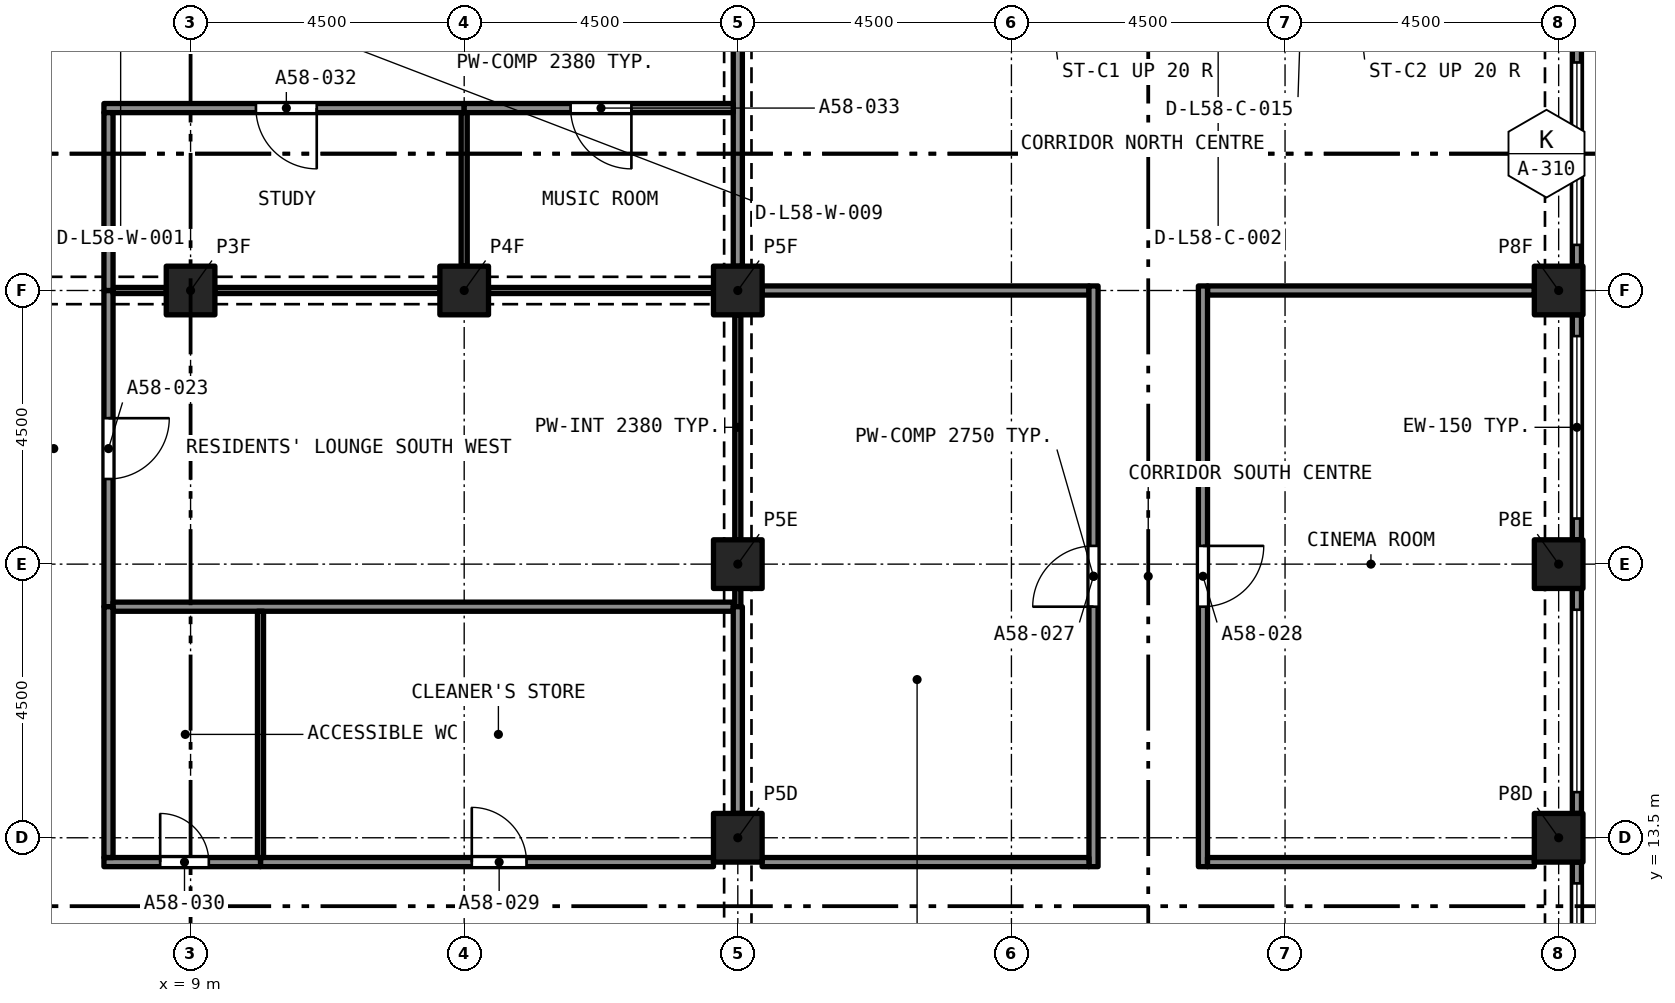
"""IFC4 building model, lengths in metres.
Left out: names, types, materials, properties, quantities, classifications, styles, units other than length and angle.
Written with IfcOpenShell. Run it as: python <this file> out.ifc"""

import sys

from ifc_helpers import new_model, si_unit, direction, frame, frame_2d, origin, origin_2d, place, context, subcontext, project, spatial, rectangle, extrude, element, fill, save


model = new_model("IFC4")
c1 = context("Model", 3, precision=1e-05, world=origin(), true_north=direction((0.0, 1.0)))
c2 = subcontext(c1, "Body", "Model", "MODEL_VIEW")
j1 = project(units=[si_unit("LENGTHUNIT", "METRE"), si_unit("PLANEANGLEUNIT", "RADIAN")], contexts=[c1])
p1 = place(None, origin())
s1 = spatial("IfcSite", under=j1, at=p1, CompositionType="ELEMENT")
p2 = place(p1, origin())
s2 = spatial("IfcBuilding", under=s1, at=p2, CompositionType="ELEMENT")
p3 = place(p2, frame((0.0, 0.0, 210.095)))
s3 = spatial("IfcBuildingStorey", under=s2, at=p3, CompositionType="ELEMENT", Elevation=210.095)
for number, where, z_axis, x_axis in (
    (1, (18.0, 13.5, 0.0), (0.0, 0.0, 1.0), (1.0, 0.0, 0.0)),
    (2, (31.5, 13.5, 0.0), (0.0, 0.0, 1.0), (1.0, 0.0, 0.0)),
    (3, (18.0, 18.0, 0.0), (0.0, 0.0, 1.0), (1.0, 0.0, 0.0)),
    (4, (31.5, 18.0, 0.0), (0.0, 0.0, 1.0), (1.0, 0.0, 0.0)),
    (5, (9.0, 22.5, 0.0), (0.0, 0.0, 1.0), (1.0, 0.0, 0.0)),
    (6, (13.5, 22.5, 0.0), (0.0, 0.0, 1.0), (1.0, 0.0, 0.0)),
    (7, (18.0, 22.5, 0.0), (0.0, 0.0, 1.0), (1.0, 0.0, 0.0)),
    (8, (31.5, 22.5, 0.0), (0.0, 0.0, 1.0), (1.0, 0.0, 0.0)),
):
    element("IfcColumn", number, at=place(p3, frame(where, z_axis=z_axis, x_axis=x_axis)), inside=s3, PredefinedType="COLUMN", context=c2, shape_type="SweptSolid", body=[
        extrude(rectangle(XDim=0.8, YDim=0.8, at=origin_2d()), origin(), (0.0, 0.0, 1.0), 3.2),
    ])
p4 = place(p3, frame((31.8, 13.1, 0.0), z_axis=(0.0, 0.0, 1.0), x_axis=(0.0, -1.0, 0.0)))
e9 = element("IfcWall", 9, at=p4, inside=s3, PredefinedType="SOLIDWALL", context=c2, shape_type="SweptSolid", body=[
    extrude(rectangle(XDim=3.7, YDim=0.15, at=frame_2d((1.85, 0.0))), origin(), (0.0, 0.0, 1.0), 3.2),
])
p5 = place(p4, frame((0.35, 0.0, 0.45)))
e10 = element("IfcOpeningElement", 10, at=p5, cuts=e9, PredefinedType="OPENING", context=c2, shape_type="SweptSolid", body=[
    extrude(rectangle(XDim=3.0, YDim=1.95, at=frame_2d((1.5, 0.975))), frame((0.0, 0.085, 0.0), z_axis=(0.0, -1.0, 0.0), x_axis=(1.0, 0.0, 0.0)), (0.0, 0.0, 1.0), 0.17),
])
p6 = place(p3, frame((31.8, 17.6, 0.0), z_axis=(0.0, 0.0, 1.0), x_axis=(0.0, -1.0, 0.0)))
e11 = element("IfcWall", 11, at=p6, inside=s3, PredefinedType="SOLIDWALL", context=c2, shape_type="SweptSolid", body=[
    extrude(rectangle(XDim=3.7, YDim=0.15, at=frame_2d((1.85, 0.0))), origin(), (0.0, 0.0, 1.0), 3.2),
])
p7 = place(p6, frame((0.35, 0.0, 0.45)))
e12 = element("IfcOpeningElement", 12, at=p7, cuts=e11, PredefinedType="OPENING", context=c2, shape_type="SweptSolid", body=[
    extrude(rectangle(XDim=3.0, YDim=1.95, at=frame_2d((1.5, 0.975))), frame((0.0, 0.085, 0.0), z_axis=(0.0, -1.0, 0.0), x_axis=(1.0, 0.0, 0.0)), (0.0, 0.0, 1.0), 0.17),
])
p8 = place(p3, frame((31.8, 22.1, 0.0), z_axis=(0.0, 0.0, 1.0), x_axis=(0.0, -1.0, 0.0)))
e13 = element("IfcWall", 13, at=p8, inside=s3, PredefinedType="SOLIDWALL", context=c2, shape_type="SweptSolid", body=[
    extrude(rectangle(XDim=3.7, YDim=0.15, at=frame_2d((1.85, 0.0))), origin(), (0.0, 0.0, 1.0), 3.2),
])
p9 = place(p8, frame((0.35, 0.0, 0.45)))
e14 = element("IfcOpeningElement", 14, at=p9, cuts=e13, PredefinedType="OPENING", context=c2, shape_type="SweptSolid", body=[
    extrude(rectangle(XDim=3.0, YDim=1.95, at=frame_2d((1.5, 0.975))), frame((0.0, 0.085, 0.0), z_axis=(0.0, -1.0, 0.0), x_axis=(1.0, 0.0, 0.0)), (0.0, 0.0, 1.0), 0.17),
])
p10 = place(p3, frame((31.8, 26.6, 0.0), z_axis=(0.0, 0.0, 1.0), x_axis=(0.0, -1.0, 0.0)))
e15 = element("IfcWall", 15, at=p10, inside=s3, PredefinedType="SOLIDWALL", context=c2, shape_type="SweptSolid", body=[
    extrude(rectangle(XDim=3.7, YDim=0.15, at=frame_2d((1.85, 0.0))), origin(), (0.0, 0.0, 1.0), 3.2),
])
p11 = place(p10, frame((0.35, 0.0, 0.45)))
e16 = element("IfcOpeningElement", 16, at=p11, cuts=e15, PredefinedType="OPENING", context=c2, shape_type="SweptSolid", body=[
    extrude(rectangle(XDim=3.0, YDim=1.95, at=frame_2d((1.5, 0.975))), frame((0.0, 0.085, 0.0), z_axis=(0.0, -1.0, 0.0), x_axis=(1.0, 0.0, 0.0)), (0.0, 0.0, 1.0), 0.17),
])
p12 = place(p3, frame((18.0, 18.4, 0.0), z_axis=(0.0, 0.0, 1.0), x_axis=(0.0, 1.0, 0.0)))
e17 = element("IfcWall", 17, at=p12, inside=s3, PredefinedType="PARTITIONING", context=c2, shape_type="SweptSolid", body=[
    extrude(rectangle(XDim=3.7, YDim=0.1, at=frame_2d((1.85, 0.0))), origin(), (0.0, 0.0, 1.0), 2.38),
])
p13 = place(p3, frame((18.0, 17.3, 0.0), z_axis=(0.0, 0.0, 1.0), x_axis=(0.0, 1.0, 0.0)))
e18 = element("IfcWall", 18, at=p13, inside=s3, PredefinedType="PARTITIONING", context=c2, shape_type="SweptSolid", body=[
    extrude(rectangle(XDim=0.3, YDim=0.1, at=frame_2d((0.15, 0.0))), origin(), (0.0, 0.0, 1.0), 2.75),
])
p14 = place(p3, frame((7.65, 22.5, 0.0), z_axis=(0.0, 0.0, 1.0), x_axis=(0.0, -1.0, 0.0)))
e19 = element("IfcWall", 19, at=p14, inside=s3, PredefinedType="PARTITIONING", context=c2, shape_type="SweptSolid", body=[
    extrude(rectangle(XDim=5.2, YDim=0.15, at=frame_2d((2.6, 0.0))), origin(), (0.0, 0.0, 1.0), 2.9),
])
p15 = place(p14, frame((2.1, 0.0, 0.0)))
e20 = element("IfcOpeningElement", 20, at=p15, cuts=e19, PredefinedType="OPENING", context=c2, shape_type="SweptSolid", body=[
    extrude(rectangle(XDim=1.0, YDim=2.1, at=frame_2d((0.5, 1.05))), frame((0.0, 0.085, 0.0), z_axis=(0.0, -1.0, 0.0), x_axis=(1.0, 0.0, 0.0)), (0.0, 0.0, 1.0), 0.17),
])
p16 = place(p3, frame((7.725, 22.5, 0.0), z_axis=(0.0, 0.0, 1.0), x_axis=(1.0, 0.0, 0.0)))
e21 = element("IfcWall", 21, at=p16, inside=s3, PredefinedType="PARTITIONING", context=c2, shape_type="SweptSolid", body=[
    extrude(rectangle(XDim=0.875, YDim=0.1, at=frame_2d((0.438, 0.0))), origin(), (0.0, 0.0, 1.0), 2.38),
])
for number, where, z_axis, x_axis in (
    (22, (9.4, 22.5, 0.0), (0.0, 0.0, 1.0), (1.0, 0.0, 0.0)),
    (23, (13.9, 22.5, 0.0), (0.0, 0.0, 1.0), (1.0, 0.0, 0.0)),
):
    element("IfcWall", number, at=place(p3, frame(where, z_axis=z_axis, x_axis=x_axis)), inside=s3, PredefinedType="PARTITIONING", context=c2, shape_type="SweptSolid", body=[
        extrude(rectangle(XDim=3.7, YDim=0.1, at=frame_2d((1.85, 0.0))), origin(), (0.0, 0.0, 1.0), 2.38),
    ])
p17 = place(p3, frame((7.725, 17.3, 0.0), z_axis=(0.0, 0.0, 1.0), x_axis=(1.0, 0.0, 0.0)))
e24 = element("IfcWall", 24, at=p17, inside=s3, PredefinedType="PARTITIONING", context=c2, shape_type="SweptSolid", body=[
    extrude(rectangle(XDim=10.2, YDim=0.15, at=frame_2d((5.1, 0.0))), origin(), (0.0, 0.0, 1.0), 2.9),
])
for number, where, z_axis, x_axis in (
    (25, (18.4, 22.5, 0.0), (0.0, 0.0, 1.0), (1.0, 0.0, 0.0)),
    (26, (25.725, 22.5, 0.0), (0.0, 0.0, 1.0), (1.0, 0.0, 0.0)),
):
    element("IfcWall", number, at=place(p3, frame(where, z_axis=z_axis, x_axis=x_axis)), inside=s3, PredefinedType="PARTITIONING", context=c2, shape_type="SweptSolid", body=[
        extrude(rectangle(XDim=5.375, YDim=0.15, at=frame_2d((2.688, 0.0))), origin(), (0.0, 0.0, 1.0), 2.75),
    ])
p18 = place(p3, frame((18.0, 22.9, 0.0), z_axis=(0.0, 0.0, 1.0), x_axis=(0.0, 1.0, 0.0)))
e27 = element("IfcWall", 27, at=p18, inside=s3, PredefinedType="PARTITIONING", context=c2, shape_type="SweptSolid", body=[
    extrude(rectangle(XDim=3.7, YDim=0.15, at=frame_2d((1.85, 0.0))), origin(), (0.0, 0.0, 1.0), 2.38),
])
p19 = place(p3, frame((23.85, 13.025, 0.0), z_axis=(0.0, 0.0, 1.0), x_axis=(0.0, 1.0, 0.0)))
e28 = element("IfcWall", 28, at=p19, inside=s3, PredefinedType="PARTITIONING", context=c2, shape_type="SweptSolid", body=[
    extrude(rectangle(XDim=9.55, YDim=0.15, at=frame_2d((4.775, 0.0))), origin(), (0.0, 0.0, 1.0), 2.75),
])
p20 = place(p19, frame((4.275, 0.0, 0.0)))
e29 = element("IfcOpeningElement", 29, at=p20, cuts=e28, PredefinedType="OPENING", context=c2, shape_type="SweptSolid", body=[
    extrude(rectangle(XDim=1.0, YDim=2.1, at=frame_2d((0.5, 1.05))), frame((0.0, 0.085, 0.0), z_axis=(0.0, -1.0, 0.0), x_axis=(1.0, 0.0, 0.0)), (0.0, 0.0, 1.0), 0.17),
])
p21 = place(p3, frame((25.65, 22.575, 0.0), z_axis=(0.0, 0.0, 1.0), x_axis=(0.0, -1.0, 0.0)))
e30 = element("IfcWall", 30, at=p21, inside=s3, PredefinedType="PARTITIONING", context=c2, shape_type="SweptSolid", body=[
    extrude(rectangle(XDim=9.55, YDim=0.15, at=frame_2d((4.775, 0.0))), origin(), (0.0, 0.0, 1.0), 2.75),
])
p22 = place(p21, frame((4.275, 0.0, 0.0)))
e31 = element("IfcOpeningElement", 31, at=p22, cuts=e30, PredefinedType="OPENING", context=c2, shape_type="SweptSolid", body=[
    extrude(rectangle(XDim=1.0, YDim=2.1, at=frame_2d((0.5, 1.05))), frame((0.0, 0.085, 0.0), z_axis=(0.0, -1.0, 0.0), x_axis=(1.0, 0.0, 0.0)), (0.0, 0.0, 1.0), 0.17),
])
for number, where, z_axis, x_axis in (
    (32, (18.4, 13.1, 0.0), (0.0, 0.0, 1.0), (1.0, 0.0, 0.0)),
    (33, (25.725, 13.1, 0.0), (0.0, 0.0, 1.0), (1.0, 0.0, 0.0)),
):
    element("IfcWall", number, at=place(p3, frame(where, z_axis=z_axis, x_axis=x_axis)), inside=s3, PredefinedType="PARTITIONING", context=c2, shape_type="SweptSolid", body=[
        extrude(rectangle(XDim=5.375, YDim=0.15, at=frame_2d((2.688, 0.0))), origin(), (0.0, 0.0, 1.0), 2.75),
    ])
p23 = place(p3, frame((10.15, 13.1, 0.0), z_axis=(0.0, 0.0, 1.0), x_axis=(1.0, 0.0, 0.0)))
e34 = element("IfcWall", 34, at=p23, inside=s3, PredefinedType="PARTITIONING", context=c2, shape_type="SweptSolid", body=[
    extrude(rectangle(XDim=7.45, YDim=0.15, at=frame_2d((3.725, 0.0))), origin(), (0.0, 0.0, 1.0), 2.9),
])
p24 = place(p23, frame((3.475, 0.0, 0.0)))
e35 = element("IfcOpeningElement", 35, at=p24, cuts=e34, PredefinedType="OPENING", context=c2, shape_type="SweptSolid", body=[
    extrude(rectangle(XDim=0.9, YDim=2.1, at=frame_2d((0.45, 1.05))), frame((0.0, 0.085, 0.0), z_axis=(0.0, -1.0, 0.0), x_axis=(1.0, 0.0, 0.0)), (0.0, 0.0, 1.0), 0.17),
])
p25 = place(p3, frame((7.575, 13.1, 0.0), z_axis=(0.0, 0.0, 1.0), x_axis=(1.0, 0.0, 0.0)))
e36 = element("IfcWall", 36, at=p25, inside=s3, PredefinedType="PARTITIONING", context=c2, shape_type="SweptSolid", body=[
    extrude(rectangle(XDim=2.575, YDim=0.15, at=frame_2d((1.288, 0.0))), origin(), (0.0, 0.0, 1.0), 2.9),
])
p26 = place(p25, frame((0.925, 0.0, 0.0)))
e37 = element("IfcOpeningElement", 37, at=p26, cuts=e36, PredefinedType="OPENING", context=c2, shape_type="SweptSolid", body=[
    extrude(rectangle(XDim=0.8, YDim=2.1, at=frame_2d((0.4, 1.05))), frame((0.0, 0.085, 0.0), z_axis=(0.0, -1.0, 0.0), x_axis=(1.0, 0.0, 0.0)), (0.0, 0.0, 1.0), 0.17),
])
p27 = place(p3, frame((18.0, 13.9, 0.0), z_axis=(0.0, 0.0, 1.0), x_axis=(0.0, 1.0, 0.0)))
e38 = element("IfcWall", 38, at=p27, inside=s3, PredefinedType="PARTITIONING", context=c2, shape_type="SweptSolid", body=[
    extrude(rectangle(XDim=3.4, YDim=0.15, at=frame_2d((1.7, 0.0))), origin(), (0.0, 0.0, 1.0), 2.38),
])
p28 = place(p3, frame((13.5, 25.5, 0.0), z_axis=(0.0, 0.0, 1.0), x_axis=(-1.0, 0.0, 0.0)))
e39 = element("IfcWall", 39, at=p28, inside=s3, PredefinedType="PARTITIONING", context=c2, shape_type="SweptSolid", body=[
    extrude(rectangle(XDim=5.925, YDim=0.15, at=frame_2d((2.962, 0.0))), origin(), (0.0, 0.0, 1.0), 2.9),
])
p29 = place(p28, frame((2.425, 0.0, 0.0)))
e40 = element("IfcOpeningElement", 40, at=p29, cuts=e39, PredefinedType="OPENING", context=c2, shape_type="SweptSolid", body=[
    extrude(rectangle(XDim=1.0, YDim=2.1, at=frame_2d((0.5, 1.05))), frame((0.0, 0.085, 0.0), z_axis=(0.0, -1.0, 0.0), x_axis=(1.0, 0.0, 0.0)), (0.0, 0.0, 1.0), 0.17),
])
p30 = place(p3, frame((7.65, 22.5, 0.0), z_axis=(0.0, 0.0, 1.0), x_axis=(0.0, 1.0, 0.0)))
e41 = element("IfcWall", 41, at=p30, inside=s3, PredefinedType="PARTITIONING", context=c2, shape_type="SweptSolid", body=[
    extrude(rectangle(XDim=2.925, YDim=0.15, at=frame_2d((1.462, 0.0))), origin(), (0.0, 0.0, 1.0), 2.9),
])
p31 = place(p3, frame((17.925, 25.5, 0.0), z_axis=(0.0, 0.0, 1.0), x_axis=(-1.0, 0.0, 0.0)))
e42 = element("IfcWall", 42, at=p31, inside=s3, PredefinedType="PARTITIONING", context=c2, shape_type="SweptSolid", body=[
    extrude(rectangle(XDim=4.425, YDim=0.15, at=frame_2d((2.212, 0.0))), origin(), (0.0, 0.0, 1.0), 2.9),
])
p32 = place(p31, frame((1.675, 0.0, 0.0)))
e43 = element("IfcOpeningElement", 43, at=p32, cuts=e42, PredefinedType="OPENING", context=c2, shape_type="SweptSolid", body=[
    extrude(rectangle(XDim=1.0, YDim=2.1, at=frame_2d((0.5, 1.05))), frame((0.0, 0.085, 0.0), z_axis=(0.0, -1.0, 0.0), x_axis=(1.0, 0.0, 0.0)), (0.0, 0.0, 1.0), 0.17),
])
p33 = place(p3, frame((7.65, 13.175, 0.0), z_axis=(0.0, 0.0, 1.0), x_axis=(0.0, 1.0, 0.0)))
e44 = element("IfcWall", 44, at=p33, inside=s3, PredefinedType="PARTITIONING", context=c2, shape_type="SweptSolid", body=[
    extrude(rectangle(XDim=4.125, YDim=0.15, at=frame_2d((2.062, 0.0))), origin(), (0.0, 0.0, 1.0), 2.9),
])
p34 = place(p3, frame((13.5, 22.9, 0.0), z_axis=(0.0, 0.0, 1.0), x_axis=(0.0, 1.0, 0.0)))
e45 = element("IfcWall", 45, at=p34, inside=s3, PredefinedType="PARTITIONING", context=c2, shape_type="SweptSolid", body=[
    extrude(rectangle(XDim=2.525, YDim=0.1, at=frame_2d((1.263, 0.0))), origin(), (0.0, 0.0, 1.0), 2.9),
])
p35 = place(p3, frame((10.15, 13.175, 0.0), z_axis=(0.0, 0.0, 1.0), x_axis=(0.0, 1.0, 0.0)))
e46 = element("IfcWall", 46, at=p35, inside=s3, PredefinedType="PARTITIONING", context=c2, shape_type="SweptSolid", body=[
    extrude(rectangle(XDim=4.05, YDim=0.1, at=frame_2d((2.025, 0.0))), origin(), (0.0, 0.0, 1.0), 2.9),
])
p36 = place(p5, origin())
e47 = element("IfcWindow", 47, at=p36, inside=s3, PartitioningType="SINGLE_PANEL", PredefinedType="WINDOW", context=c2, shape_type="SweptSolid", body=[
    extrude(rectangle(XDim=3.0, YDim=1.95, at=frame_2d((1.5, 0.975))), frame((0.0, 0.03, 0.0), z_axis=(0.0, -1.0, 0.0), x_axis=(1.0, 0.0, 0.0)), (0.0, 0.0, 1.0), 0.06),
])
fill(e10, e47)
p37 = place(p7, origin())
e48 = element("IfcWindow", 48, at=p37, inside=s3, PartitioningType="SINGLE_PANEL", PredefinedType="WINDOW", context=c2, shape_type="SweptSolid", body=[
    extrude(rectangle(XDim=3.0, YDim=1.95, at=frame_2d((1.5, 0.975))), frame((0.0, 0.03, 0.0), z_axis=(0.0, -1.0, 0.0), x_axis=(1.0, 0.0, 0.0)), (0.0, 0.0, 1.0), 0.06),
])
fill(e12, e48)
p38 = place(p9, origin())
e49 = element("IfcWindow", 49, at=p38, inside=s3, PartitioningType="SINGLE_PANEL", PredefinedType="WINDOW", context=c2, shape_type="SweptSolid", body=[
    extrude(rectangle(XDim=3.0, YDim=1.95, at=frame_2d((1.5, 0.975))), frame((0.0, 0.03, 0.0), z_axis=(0.0, -1.0, 0.0), x_axis=(1.0, 0.0, 0.0)), (0.0, 0.0, 1.0), 0.06),
])
fill(e14, e49)
p39 = place(p11, origin())
e50 = element("IfcWindow", 50, at=p39, inside=s3, PartitioningType="SINGLE_PANEL", PredefinedType="WINDOW", context=c2, shape_type="SweptSolid", body=[
    extrude(rectangle(XDim=3.0, YDim=1.95, at=frame_2d((1.5, 0.975))), frame((0.0, 0.03, 0.0), z_axis=(0.0, -1.0, 0.0), x_axis=(1.0, 0.0, 0.0)), (0.0, 0.0, 1.0), 0.06),
])
fill(e16, e50)
p40 = place(p15, origin())
e51 = element("IfcDoor", 51, at=p40, inside=s3, OperationType="SINGLE_SWING_RIGHT", PredefinedType="DOOR", context=c2, shape_type="SweptSolid", body=[
    extrude(rectangle(XDim=1.0, YDim=2.1, at=frame_2d((0.5, 1.05))), frame((0.0, 0.025, 0.0), z_axis=(0.0, -1.0, 0.0), x_axis=(1.0, 0.0, 0.0)), (0.0, 0.0, 1.0), 0.05),
])
fill(e20, e51)
p41 = place(p20, origin())
e52 = element("IfcDoor", 52, at=p41, inside=s3, OperationType="SINGLE_SWING_RIGHT", PredefinedType="DOOR", context=c2, shape_type="SweptSolid", body=[
    extrude(rectangle(XDim=1.0, YDim=2.1, at=frame_2d((0.5, 1.05))), frame((0.0, 0.025, 0.0), z_axis=(0.0, -1.0, 0.0), x_axis=(1.0, 0.0, 0.0)), (0.0, 0.0, 1.0), 0.05),
])
fill(e29, e52)
p42 = place(p22, origin())
e53 = element("IfcDoor", 53, at=p42, inside=s3, OperationType="SINGLE_SWING_LEFT", PredefinedType="DOOR", context=c2, shape_type="SweptSolid", body=[
    extrude(rectangle(XDim=1.0, YDim=2.1, at=frame_2d((0.5, 1.05))), frame((0.0, 0.025, 0.0), z_axis=(0.0, -1.0, 0.0), x_axis=(1.0, 0.0, 0.0)), (0.0, 0.0, 1.0), 0.05),
])
fill(e31, e53)
p43 = place(p24, origin())
e54 = element("IfcDoor", 54, at=p43, inside=s3, OperationType="SINGLE_SWING_RIGHT", PredefinedType="DOOR", context=c2, shape_type="SweptSolid", body=[
    extrude(rectangle(XDim=0.9, YDim=2.1, at=frame_2d((0.45, 1.05))), frame((0.0, 0.025, 0.0), z_axis=(0.0, -1.0, 0.0), x_axis=(1.0, 0.0, 0.0)), (0.0, 0.0, 1.0), 0.05),
])
fill(e35, e54)
p44 = place(p26, origin())
e55 = element("IfcDoor", 55, at=p44, inside=s3, OperationType="SINGLE_SWING_RIGHT", PredefinedType="DOOR", context=c2, shape_type="SweptSolid", body=[
    extrude(rectangle(XDim=0.8, YDim=2.1, at=frame_2d((0.4, 1.05))), frame((0.0, 0.025, 0.0), z_axis=(0.0, -1.0, 0.0), x_axis=(1.0, 0.0, 0.0)), (0.0, 0.0, 1.0), 0.05),
])
fill(e37, e55)
p45 = place(p29, origin())
e56 = element("IfcDoor", 56, at=p45, inside=s3, OperationType="SINGLE_SWING_LEFT", PredefinedType="DOOR", context=c2, shape_type="SweptSolid", body=[
    extrude(rectangle(XDim=1.0, YDim=2.1, at=frame_2d((0.5, 1.05))), frame((0.0, 0.025, 0.0), z_axis=(0.0, -1.0, 0.0), x_axis=(1.0, 0.0, 0.0)), (0.0, 0.0, 1.0), 0.05),
])
fill(e40, e56)
p46 = place(p32, origin())
e57 = element("IfcDoor", 57, at=p46, inside=s3, OperationType="SINGLE_SWING_LEFT", PredefinedType="DOOR", context=c2, shape_type="SweptSolid", body=[
    extrude(rectangle(XDim=1.0, YDim=2.1, at=frame_2d((0.5, 1.05))), frame((0.0, 0.025, 0.0), z_axis=(0.0, -1.0, 0.0), x_axis=(1.0, 0.0, 0.0)), (0.0, 0.0, 1.0), 0.05),
])
fill(e43, e57)
save(model, sys.argv[1])
